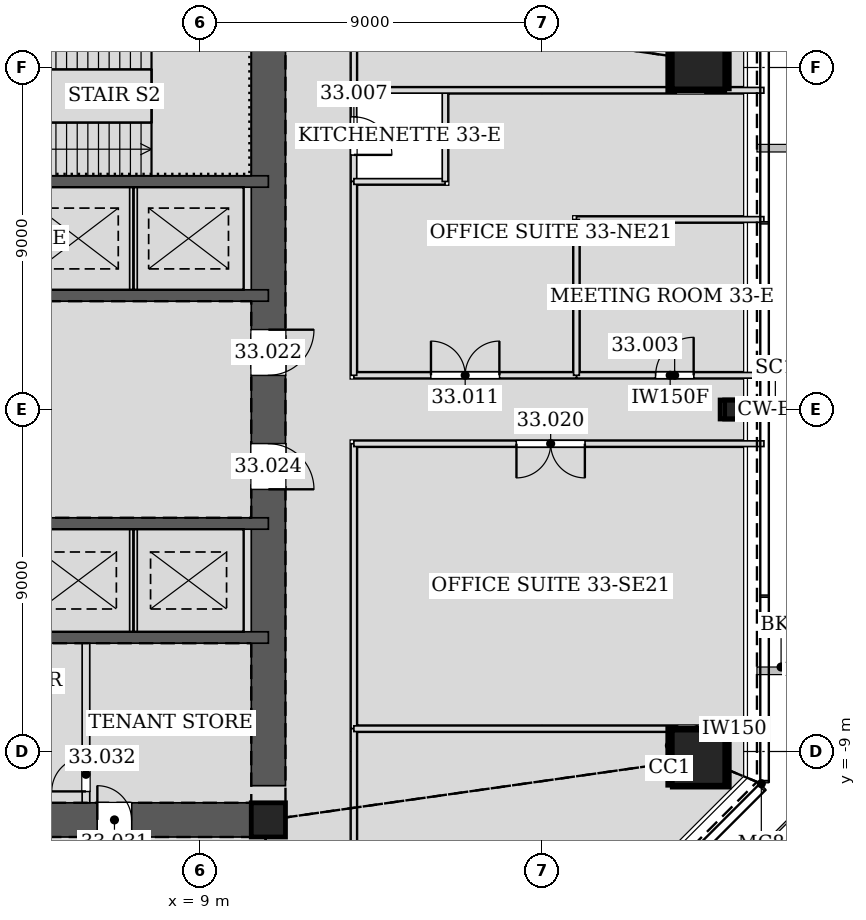
"""IFC4 building model, lengths in metres.
Left out: names, types, materials, properties, quantities, classifications, styles, units other than length and angle.
Written with IfcOpenShell. Run it as: python <this file> out.ifc"""

import sys

from ifc_helpers import new_model, si_unit, direction, frame, frame_2d, origin, origin_2d, place, context, subcontext, project, spatial, rectangle, hollow_rectangle, extrude, element, fill, save


model = new_model("IFC4")
c1 = context("Model", 3, precision=1e-05, world=origin(), true_north=direction((0.0, 1.0)))
c2 = subcontext(c1, "Body", "Model", "MODEL_VIEW")
j1 = project(units=[si_unit("LENGTHUNIT", "METRE"), si_unit("PLANEANGLEUNIT", "RADIAN")], contexts=[c1])
p1 = place(None, origin())
s1 = spatial("IfcSite", under=j1, at=p1, CompositionType="ELEMENT")
p2 = place(p1, origin())
s2 = spatial("IfcBuilding", under=s1, at=p2, CompositionType="ELEMENT")
p3 = place(p2, frame((0.0, 0.0, 147.0)))
s3 = spatial("IfcBuildingStorey", under=s2, at=p3, CompositionType="ELEMENT", Elevation=147.0)
for number, where, z_axis, x_axis in (
    (1, (22.178, 9.187, 0.0), (-0.028, -0.012, 1.0), (0.384, -0.923, 0.0)),
    (2, (22.178, -9.187, 0.0), (-0.028, 0.012, 1.0), (-0.384, -0.923, 0.0)),
):
    element("IfcColumn", number, at=place(p3, frame(where, z_axis=z_axis, x_axis=x_axis)), inside=s3, PredefinedType="COLUMN", context=c2, shape_type="SweptSolid", body=[
        extrude(hollow_rectangle(XDim=1.5, YDim=1.5, WallThickness=0.07, at=origin_2d()), origin(), (0.0, 0.0, 1.0), 4.202),
    ])
p4 = place(p3, frame((23.056, 0.0, 0.0), z_axis=(-0.028297679255, 0.0, 0.99959954049), x_axis=(0.0, -1.0, 0.0)))
e3 = element("IfcColumn", 3, at=p4, inside=s3, PredefinedType="COLUMN", context=c2, shape_type="SweptSolid", body=[
    extrude(hollow_rectangle(XDim=0.5, YDim=0.5, WallThickness=0.025, at=origin_2d()), origin(), (0.0, 0.0, 1.0), 4.202),
])
p5 = place(p3, frame((10.8, -10.8, 0.0), z_axis=(0.0, 0.0, 1.0), x_axis=(1.0, 0.0, 0.0)))
e4 = element("IfcColumn", 4, at=p5, inside=s3, PredefinedType="COLUMN", context=c2, shape_type="SweptSolid", body=[
    extrude(hollow_rectangle(XDim=0.9, YDim=0.9, WallThickness=0.06, at=origin_2d()), origin(), (0.0, 0.0, 1.0), 4.2),
])
p6 = place(p3, frame((-10.8, -10.8, 0.0), z_axis=(0.0, 0.0, 1.0), x_axis=(1.0, 0.0, 0.0)))
e5 = element("IfcWall", 5, at=p6, inside=s3, PredefinedType="SOLIDWALL", context=c2, shape_type="SweptSolid", body=[
    extrude(rectangle(XDim=21.6, YDim=0.9, at=frame_2d((10.8, 0.0))), origin(), (0.0, 0.0, 1.0), 4.2),
])
p7 = place(p6, frame((10.05, 0.0, 0.0)))
e6 = element("IfcOpeningElement", 6, at=p7, cuts=e5, PredefinedType="OPENING", context=c2, shape_type="SweptSolid", body=[
    extrude(rectangle(XDim=1.5, YDim=2.1, at=frame_2d((0.75, 1.05))), frame((0.0, 0.46, 0.0), z_axis=(0.0, -1.0, 0.0), x_axis=(1.0, 0.0, 0.0)), (0.0, 0.0, 1.0), 0.92),
])
p8 = place(p6, frame((17.1, 0.0, 0.0)))
e7 = element("IfcOpeningElement", 7, at=p8, cuts=e5, PredefinedType="OPENING", context=c2, shape_type="SweptSolid", body=[
    extrude(rectangle(XDim=0.9, YDim=2.1, at=frame_2d((0.45, 1.05))), frame((0.0, 0.46, 0.0), z_axis=(0.0, -1.0, 0.0), x_axis=(1.0, 0.0, 0.0)), (0.0, 0.0, 1.0), 0.92),
])
p9 = place(p3, frame((10.8, -10.8, 0.0), z_axis=(0.0, 0.0, 1.0), x_axis=(0.0, 1.0, 0.0)))
e8 = element("IfcWall", 8, at=p9, inside=s3, PredefinedType="SOLIDWALL", context=c2, shape_type="SweptSolid", body=[
    extrude(rectangle(XDim=21.6, YDim=0.9, at=frame_2d((10.8, 0.0))), origin(), (0.0, 0.0, 1.0), 4.2),
])
p10 = place(p9, frame((11.7, 0.0, 0.0)))
e9 = element("IfcOpeningElement", 9, at=p10, cuts=e8, PredefinedType="OPENING", context=c2, shape_type="SweptSolid", body=[
    extrude(rectangle(XDim=1.2, YDim=2.1, at=frame_2d((0.6, 1.05))), frame((0.0, 0.46, 0.0), z_axis=(0.0, -1.0, 0.0), x_axis=(1.0, 0.0, 0.0)), (0.0, 0.0, 1.0), 0.92),
])
p11 = place(p9, frame((8.7, 0.0, 0.0)))
e10 = element("IfcOpeningElement", 10, at=p11, cuts=e8, PredefinedType="OPENING", context=c2, shape_type="SweptSolid", body=[
    extrude(rectangle(XDim=1.2, YDim=2.1, at=frame_2d((0.6, 1.05))), frame((0.0, 0.46, 0.0), z_axis=(0.0, -1.0, 0.0), x_axis=(1.0, 0.0, 0.0)), (0.0, 0.0, 1.0), 0.92),
])
p12 = place(p3, frame((-10.8, 3.0, 0.0), z_axis=(0.0, 0.0, 1.0), x_axis=(1.0, 0.0, 0.0)))
e11 = element("IfcWall", 11, at=p12, inside=s3, PredefinedType="SOLIDWALL", context=c2, shape_type="SweptSolid", body=[
    extrude(rectangle(XDim=21.6, YDim=0.3, at=frame_2d((10.8, 0.0))), origin(), (0.0, 0.0, 1.0), 4.2),
])
p13 = place(p12, frame((1.65, 0.0, 0.0)))
e12 = element("IfcOpeningElement", 12, at=p13, cuts=e11, PredefinedType="OPENING", context=c2, shape_type="SweptSolid", body=[
    extrude(rectangle(XDim=0.9, YDim=2.1, at=frame_2d((0.45, 1.05))), frame((0.0, 0.16, 0.0), z_axis=(0.0, -1.0, 0.0), x_axis=(1.0, 0.0, 0.0)), (0.0, 0.0, 1.0), 0.32),
])
p14 = place(p12, frame((4.55, 0.0, 0.0)))
e13 = element("IfcOpeningElement", 13, at=p14, cuts=e11, PredefinedType="OPENING", context=c2, shape_type="SweptSolid", body=[
    extrude(rectangle(XDim=0.9, YDim=2.1, at=frame_2d((0.45, 1.05))), frame((0.0, 0.16, 0.0), z_axis=(0.0, -1.0, 0.0), x_axis=(1.0, 0.0, 0.0)), (0.0, 0.0, 1.0), 0.32),
])
p15 = place(p12, frame((7.4, 0.0, 0.0)))
e14 = element("IfcOpeningElement", 14, at=p15, cuts=e11, PredefinedType="OPENING", context=c2, shape_type="SweptSolid", body=[
    extrude(rectangle(XDim=1.0, YDim=2.1, at=frame_2d((0.5, 1.05))), frame((0.0, 0.16, 0.0), z_axis=(0.0, -1.0, 0.0), x_axis=(1.0, 0.0, 0.0)), (0.0, 0.0, 1.0), 0.32),
])
p16 = place(p12, frame((13.25, 0.0, 0.0)))
e15 = element("IfcOpeningElement", 15, at=p16, cuts=e11, PredefinedType="OPENING", context=c2, shape_type="SweptSolid", body=[
    extrude(rectangle(XDim=0.9, YDim=2.1, at=frame_2d((0.45, 1.05))), frame((0.0, 0.16, 0.0), z_axis=(0.0, -1.0, 0.0), x_axis=(1.0, 0.0, 0.0)), (0.0, 0.0, 1.0), 0.32),
])
p17 = place(p3, frame((-10.8, 6.0, 0.0), z_axis=(0.0, 0.0, 1.0), x_axis=(1.0, 0.0, 0.0)))
e16 = element("IfcWall", 16, at=p17, inside=s3, PredefinedType="SOLIDWALL", context=c2, shape_type="SweptSolid", body=[
    extrude(rectangle(XDim=21.6, YDim=0.3, at=frame_2d((10.8, 0.0))), origin(), (0.0, 0.0, 1.0), 4.2),
])
p18 = place(p17, frame((10.25, 0.0, 0.0)))
e17 = element("IfcOpeningElement", 17, at=p18, cuts=e16, PredefinedType="OPENING", context=c2, shape_type="SweptSolid", body=[
    extrude(rectangle(XDim=1.1, YDim=2.1, at=frame_2d((0.55, 1.05))), frame((0.0, 0.16, 0.0), z_axis=(0.0, -1.0, 0.0), x_axis=(1.0, 0.0, 0.0)), (0.0, 0.0, 1.0), 0.32),
])
p19 = place(p3, frame((-10.8, -3.0, 0.0), z_axis=(0.0, 0.0, 1.0), x_axis=(1.0, 0.0, 0.0)))
e18 = element("IfcWall", 18, at=p19, inside=s3, PredefinedType="SOLIDWALL", context=c2, shape_type="SweptSolid", body=[
    extrude(rectangle(XDim=21.6, YDim=0.3, at=frame_2d((10.8, 0.0))), origin(), (0.0, 0.0, 1.0), 4.2),
])
p20 = place(p19, frame((1.55, 0.0, 0.0)))
e19 = element("IfcOpeningElement", 19, at=p20, cuts=e18, PredefinedType="OPENING", context=c2, shape_type="SweptSolid", body=[
    extrude(rectangle(XDim=1.1, YDim=2.1, at=frame_2d((0.55, 1.05))), frame((0.0, 0.16, 0.0), z_axis=(0.0, -1.0, 0.0), x_axis=(1.0, 0.0, 0.0)), (0.0, 0.0, 1.0), 0.32),
])
p21 = place(p19, frame((4.45, 0.0, 0.0)))
e20 = element("IfcOpeningElement", 20, at=p21, cuts=e18, PredefinedType="OPENING", context=c2, shape_type="SweptSolid", body=[
    extrude(rectangle(XDim=1.1, YDim=2.1, at=frame_2d((0.55, 1.05))), frame((0.0, 0.16, 0.0), z_axis=(0.0, -1.0, 0.0), x_axis=(1.0, 0.0, 0.0)), (0.0, 0.0, 1.0), 0.32),
])
p22 = place(p19, frame((7.35, 0.0, 0.0)))
e21 = element("IfcOpeningElement", 21, at=p22, cuts=e18, PredefinedType="OPENING", context=c2, shape_type="SweptSolid", body=[
    extrude(rectangle(XDim=1.1, YDim=2.1, at=frame_2d((0.55, 1.05))), frame((0.0, 0.16, 0.0), z_axis=(0.0, -1.0, 0.0), x_axis=(1.0, 0.0, 0.0)), (0.0, 0.0, 1.0), 0.32),
])
p23 = place(p19, frame((13.15, 0.0, 0.0)))
e22 = element("IfcOpeningElement", 22, at=p23, cuts=e18, PredefinedType="OPENING", context=c2, shape_type="SweptSolid", body=[
    extrude(rectangle(XDim=1.1, YDim=2.1, at=frame_2d((0.55, 1.05))), frame((0.0, 0.16, 0.0), z_axis=(0.0, -1.0, 0.0), x_axis=(1.0, 0.0, 0.0)), (0.0, 0.0, 1.0), 0.32),
])
p24 = place(p3, frame((-10.8, -6.0, 0.0), z_axis=(0.0, 0.0, 1.0), x_axis=(1.0, 0.0, 0.0)))
e23 = element("IfcWall", 23, at=p24, inside=s3, PredefinedType="SOLIDWALL", context=c2, shape_type="SweptSolid", body=[
    extrude(rectangle(XDim=21.6, YDim=0.3, at=frame_2d((10.8, 0.0))), origin(), (0.0, 0.0, 1.0), 4.2),
])
p25 = place(p24, frame((10.25, 0.0, 0.0)))
e24 = element("IfcOpeningElement", 24, at=p25, cuts=e23, PredefinedType="OPENING", context=c2, shape_type="SweptSolid", body=[
    extrude(rectangle(XDim=1.1, YDim=2.1, at=frame_2d((0.55, 1.05))), frame((0.0, 0.16, 0.0), z_axis=(0.0, -1.0, 0.0), x_axis=(1.0, 0.0, 0.0)), (0.0, 0.0, 1.0), 0.32),
])
p26 = place(p3, frame((23.84, 0.9, 0.0), z_axis=(0.0, 0.0, 1.0), x_axis=(-1.0, 0.0, 0.0)))
e25 = element("IfcWall", 25, at=p26, inside=s3, PredefinedType="PARTITIONING", context=c2, shape_type="SweptSolid", body=[
    extrude(rectangle(XDim=4.935, YDim=0.15, at=frame_2d((2.468, 0.0))), origin(), (0.0, 0.0, 1.0), 3.426),
])
p27 = place(p26, frame((1.85, 0.0, 0.0)))
e26 = element("IfcOpeningElement", 26, at=p27, cuts=e25, PredefinedType="OPENING", context=c2, shape_type="SweptSolid", body=[
    extrude(rectangle(XDim=1.0, YDim=2.1, at=frame_2d((0.5, 1.05))), frame((0.0, 0.085, 0.0), z_axis=(0.0, -1.0, 0.0), x_axis=(1.0, 0.0, 0.0)), (0.0, 0.0, 1.0), 0.17),
])
p28 = place(p3, frame((13.05, 5.999, 0.0), z_axis=(0.0, 0.0, 1.0), x_axis=(0.0, 1.0, 0.0)))
e27 = element("IfcWall", 27, at=p28, inside=s3, PredefinedType="PARTITIONING", context=c2, shape_type="SweptSolid", body=[
    extrude(rectangle(XDim=2.402, YDim=0.15, at=frame_2d((1.201, 0.0))), origin(), (0.0, 0.0, 1.0), 4.035),
])
p29 = place(p28, frame((0.701, 0.0, 0.0)))
e28 = element("IfcOpeningElement", 28, at=p29, cuts=e27, PredefinedType="OPENING", context=c2, shape_type="SweptSolid", body=[
    extrude(rectangle(XDim=1.0, YDim=2.1, at=frame_2d((0.5, 1.05))), frame((0.0, 0.085, 0.0), z_axis=(0.0, -1.0, 0.0), x_axis=(1.0, 0.0, 0.0)), (0.0, 0.0, 1.0), 0.17),
])
p30 = place(p3, frame((18.907, 0.9, 0.0), z_axis=(0.0, 0.0, 1.0), x_axis=(-1.0, 0.0, 0.0)))
e29 = element("IfcWall", 29, at=p30, inside=s3, PredefinedType="PARTITIONING", context=c2, shape_type="SweptSolid", body=[
    extrude(rectangle(XDim=5.857, YDim=0.15, at=frame_2d((2.929, 0.0))), origin(), (0.0, 0.0, 1.0), 3.426),
])
p31 = place(p30, frame((2.029, 0.0, 0.0)))
e30 = element("IfcOpeningElement", 30, at=p31, cuts=e29, PredefinedType="OPENING", context=c2, shape_type="SweptSolid", body=[
    extrude(rectangle(XDim=1.8, YDim=2.4, at=frame_2d((0.9, 1.2))), frame((0.0, 0.085, 0.0), z_axis=(0.0, -1.0, 0.0), x_axis=(1.0, 0.0, 0.0)), (0.0, 0.0, 1.0), 0.17),
])
p32 = place(p3, frame((13.05, 0.9, 0.0), z_axis=(0.0, 0.0, 1.0), x_axis=(0.0, 1.0, 0.0)))
e31 = element("IfcWall", 31, at=p32, inside=s3, PredefinedType="PARTITIONING", context=c2, shape_type="SweptSolid", body=[
    extrude(rectangle(XDim=5.101, YDim=0.15, at=frame_2d((2.551, 0.0))), origin(), (0.0, 0.0, 1.0), 4.035),
])
p33 = place(p3, frame((13.05, 8.399, 0.0), z_axis=(0.0, 0.0, 1.0), x_axis=(0.0, 1.0, 0.0)))
e32 = element("IfcWall", 32, at=p33, inside=s3, PredefinedType="PARTITIONING", context=c2, shape_type="SweptSolid", body=[
    extrude(rectangle(XDim=4.651, YDim=0.15, at=frame_2d((2.326, 0.0))), origin(), (0.0, 0.0, 1.0), 3.098),
])
p34 = place(p33, frame((1.426, 0.0, 0.0)))
e33 = element("IfcOpeningElement", 33, at=p34, cuts=e32, PredefinedType="OPENING", context=c2, shape_type="SweptSolid", body=[
    extrude(rectangle(XDim=1.8, YDim=2.4, at=frame_2d((0.9, 1.2))), frame((0.0, 0.085, 0.0), z_axis=(0.0, -1.0, 0.0), x_axis=(1.0, 0.0, 0.0)), (0.0, 0.0, 1.0), 0.17),
])
p35 = place(p3, frame((13.05, -8.401, 0.0), z_axis=(0.0, 0.0, 1.0), x_axis=(0.0, 1.0, 0.0)))
e34 = element("IfcWall", 34, at=p35, inside=s3, PredefinedType="PARTITIONING", context=c2, shape_type="SweptSolid", body=[
    extrude(rectangle(XDim=7.501, YDim=0.15, at=frame_2d((3.75, 0.0))), origin(), (0.0, 0.0, 1.0), 4.035),
])
p36 = place(p3, frame((13.05, -0.9, 0.0), z_axis=(0.0, 0.0, 1.0), x_axis=(1.0, 0.0, 0.0)))
e35 = element("IfcWall", 35, at=p36, inside=s3, PredefinedType="PARTITIONING", context=c2, shape_type="SweptSolid", body=[
    extrude(rectangle(XDim=10.79, YDim=0.15, at=frame_2d((5.395, 0.0))), origin(), (0.0, 0.0, 1.0), 3.426),
])
p37 = place(p36, frame((4.278, 0.0, 0.0)))
e36 = element("IfcOpeningElement", 36, at=p37, cuts=e35, PredefinedType="OPENING", context=c2, shape_type="SweptSolid", body=[
    extrude(rectangle(XDim=1.8, YDim=2.4, at=frame_2d((0.9, 1.2))), frame((0.0, 0.085, 0.0), z_axis=(0.0, -1.0, 0.0), x_axis=(1.0, 0.0, 0.0)), (0.0, 0.0, 1.0), 0.17),
])
p38 = place(p3, frame((13.05, -13.05, 0.0), z_axis=(0.0, 0.0, 1.0), x_axis=(0.0, 1.0, 0.0)))
e37 = element("IfcWall", 37, at=p38, inside=s3, PredefinedType="PARTITIONING", context=c2, shape_type="SweptSolid", body=[
    extrude(rectangle(XDim=4.651, YDim=0.15, at=frame_2d((2.326, 0.0))), origin(), (0.0, 0.0, 1.0), 3.098),
])
p39 = place(p3, frame((23.838, 5.0, 0.0), z_axis=(0.0, 0.0, 1.0), x_axis=(-1.0, 0.0, 0.0)))
e38 = element("IfcWall", 38, at=p39, inside=s3, PredefinedType="PARTITIONING", context=c2, shape_type="SweptSolid", body=[
    extrude(rectangle(XDim=4.932, YDim=0.15, at=frame_2d((2.466, 0.0))), origin(), (0.0, 0.0, 1.0), 3.426),
])
p40 = place(p3, frame((18.906, 5.0, 0.0), z_axis=(0.0, 0.0, 1.0), x_axis=(0.0, -1.0, 0.0)))
e39 = element("IfcWall", 39, at=p40, inside=s3, PredefinedType="PARTITIONING", context=c2, shape_type="SweptSolid", body=[
    extrude(rectangle(XDim=4.1, YDim=0.15, at=frame_2d((2.05, 0.0))), origin(), (0.0, 0.0, 1.0), 4.035),
])
p41 = place(p3, frame((13.05, 6.0, 0.0), z_axis=(0.0, 0.0, 1.0), x_axis=(1.0, 0.0, 0.0)))
e40 = element("IfcWall", 40, at=p41, inside=s3, PredefinedType="PARTITIONING", context=c2, shape_type="SweptSolid", body=[
    extrude(rectangle(XDim=2.4, YDim=0.15, at=frame_2d((1.2, 0.0))), origin(), (0.0, 0.0, 1.0), 3.426),
])
p42 = place(p3, frame((15.45, 6.0, 0.0), z_axis=(0.0, 0.0, 1.0), x_axis=(0.0, 1.0, 0.0)))
e41 = element("IfcWall", 41, at=p42, inside=s3, PredefinedType="PARTITIONING", context=c2, shape_type="SweptSolid", body=[
    extrude(rectangle(XDim=2.4, YDim=0.15, at=frame_2d((1.2, 0.0))), origin(), (0.0, 0.0, 1.0), 4.035),
])
p43 = place(p3, frame((13.05, 8.4, 0.0), z_axis=(0.0, 0.0, 1.0), x_axis=(1.0, 0.0, 0.0)))
e42 = element("IfcWall", 42, at=p43, inside=s3, PredefinedType="PARTITIONING", context=c2, shape_type="SweptSolid", body=[
    extrude(rectangle(XDim=8.482, YDim=0.15, at=frame_2d((4.241, 0.0))), origin(), (0.0, 0.0, 1.0), 3.426),
])
p44 = place(p3, frame((23.838, 8.4, 0.0), z_axis=(0.0, 0.0, 1.0), x_axis=(-1.0, 0.0, 0.0)))
e43 = element("IfcWall", 43, at=p44, inside=s3, PredefinedType="PARTITIONING", context=c2, shape_type="SweptSolid", body=[
    extrude(rectangle(XDim=1.55, YDim=0.15, at=frame_2d((0.775, 0.0))), origin(), (0.0, 0.0, 1.0), 4.035),
])
p45 = place(p3, frame((13.05, -8.4, 0.0), z_axis=(0.0, 0.0, 1.0), x_axis=(1.0, 0.0, 0.0)))
e44 = element("IfcWall", 44, at=p45, inside=s3, PredefinedType="PARTITIONING", context=c2, shape_type="SweptSolid", body=[
    extrude(rectangle(XDim=8.482, YDim=0.15, at=frame_2d((4.241, 0.0))), origin(), (0.0, 0.0, 1.0), 3.426),
])
p46 = place(p3, frame((22.289, -8.4, 0.0), z_axis=(0.0, 0.0, 1.0), x_axis=(1.0, 0.0, 0.0)))
e45 = element("IfcWall", 45, at=p46, inside=s3, PredefinedType="PARTITIONING", context=c2, shape_type="SweptSolid", body=[
    extrude(rectangle(XDim=1.55, YDim=0.15, at=frame_2d((0.775, 0.0))), origin(), (0.0, 0.0, 1.0), 4.035),
])
for number, where, z_axis, x_axis in (
    (46, (7.25, 3.15, 0.0), (0.0, 0.0, 1.0), (0.0, 1.0, 0.0)),
    (47, (7.25, -5.85, 0.0), (0.0, 0.0, 1.0), (0.0, 1.0, 0.0)),
):
    element("IfcWall", number, at=place(p3, frame(where, z_axis=z_axis, x_axis=x_axis)), inside=s3, PredefinedType="PARTITIONING", context=c2, shape_type="SweptSolid", body=[
        extrude(rectangle(XDim=2.7, YDim=0.2, at=frame_2d((1.35, 0.0))), origin(), (0.0, 0.0, 1.0), 4.2),
    ])
p47 = place(p3, frame((6.0, -10.35, 0.0), z_axis=(0.0, 0.0, 1.0), x_axis=(0.0, 1.0, 0.0)))
e48 = element("IfcWall", 48, at=p47, inside=s3, PredefinedType="PARTITIONING", context=c2, shape_type="SweptSolid", body=[
    extrude(rectangle(XDim=4.2, YDim=0.2, at=frame_2d((2.1, 0.0))), origin(), (0.0, 0.0, 1.0), 4.035),
])
p48 = place(p47, frame((0.3, 0.0, 0.0)))
e49 = element("IfcOpeningElement", 49, at=p48, cuts=e48, PredefinedType="OPENING", context=c2, shape_type="SweptSolid", body=[
    extrude(rectangle(XDim=0.9, YDim=2.1, at=frame_2d((0.45, 1.05))), frame((0.0, 0.11, 0.0), z_axis=(0.0, -1.0, 0.0), x_axis=(1.0, 0.0, 0.0)), (0.0, 0.0, 1.0), 0.22),
])
p49 = place(p27, frame((1.0, 0.0, 0.0), z_axis=(0.0, 0.0, 1.0), x_axis=(-1.0, 0.0, 0.0)))
e50 = element("IfcDoor", 50, at=p49, inside=s3, OperationType="SINGLE_SWING_RIGHT", PredefinedType="DOOR", context=c2, shape_type="SweptSolid", body=[
    extrude(rectangle(XDim=1.0, YDim=2.1, at=frame_2d((0.5, 1.05))), frame((0.0, 0.025, 0.0), z_axis=(0.0, -1.0, 0.0), x_axis=(1.0, 0.0, 0.0)), (0.0, 0.0, 1.0), 0.05),
])
fill(e26, e50)
p50 = place(p29, frame((1.0, 0.0, 0.0), z_axis=(0.0, 0.0, 1.0), x_axis=(-1.0, 0.0, 0.0)))
e51 = element("IfcDoor", 51, at=p50, inside=s3, OperationType="SINGLE_SWING_RIGHT", PredefinedType="DOOR", context=c2, shape_type="SweptSolid", body=[
    extrude(rectangle(XDim=1.0, YDim=2.1, at=frame_2d((0.5, 1.05))), frame((0.0, 0.025, 0.0), z_axis=(0.0, -1.0, 0.0), x_axis=(1.0, 0.0, 0.0)), (0.0, 0.0, 1.0), 0.05),
])
fill(e28, e51)
p51 = place(p31, frame((1.8, 0.0, 0.0), z_axis=(0.0, 0.0, 1.0), x_axis=(-1.0, 0.0, 0.0)))
e52 = element("IfcDoor", 52, at=p51, inside=s3, OperationType="DOUBLE_DOOR_SINGLE_SWING", PredefinedType="DOOR", context=c2, shape_type="SweptSolid", body=[
    extrude(rectangle(XDim=1.8, YDim=2.4, at=frame_2d((0.9, 1.2))), frame((0.0, 0.025, 0.0), z_axis=(0.0, -1.0, 0.0), x_axis=(1.0, 0.0, 0.0)), (0.0, 0.0, 1.0), 0.05),
])
fill(e30, e52)
p52 = place(p37, frame((1.8, 0.0, 0.0), z_axis=(0.0, 0.0, 1.0), x_axis=(-1.0, 0.0, 0.0)))
e53 = element("IfcDoor", 53, at=p52, inside=s3, OperationType="DOUBLE_DOOR_SINGLE_SWING", PredefinedType="DOOR", context=c2, shape_type="SweptSolid", body=[
    extrude(rectangle(XDim=1.8, YDim=2.4, at=frame_2d((0.9, 1.2))), frame((0.0, 0.025, 0.0), z_axis=(0.0, -1.0, 0.0), x_axis=(1.0, 0.0, 0.0)), (0.0, 0.0, 1.0), 0.05),
])
fill(e36, e53)
p53 = place(p10, frame((1.2, 0.0, 0.0), z_axis=(0.0, 0.0, 1.0), x_axis=(-1.0, 0.0, 0.0)))
e54 = element("IfcDoor", 54, at=p53, inside=s3, OperationType="SINGLE_SWING_LEFT", PredefinedType="DOOR", context=c2, shape_type="SweptSolid", body=[
    extrude(rectangle(XDim=1.2, YDim=2.1, at=frame_2d((0.6, 1.05))), frame((0.0, 0.025, 0.0), z_axis=(0.0, -1.0, 0.0), x_axis=(1.0, 0.0, 0.0)), (0.0, 0.0, 1.0), 0.05),
])
fill(e9, e54)
p54 = place(p11, frame((1.2, 0.0, 0.0), z_axis=(0.0, 0.0, 1.0), x_axis=(-1.0, 0.0, 0.0)))
e55 = element("IfcDoor", 55, at=p54, inside=s3, OperationType="SINGLE_SWING_RIGHT", PredefinedType="DOOR", context=c2, shape_type="SweptSolid", body=[
    extrude(rectangle(XDim=1.2, YDim=2.1, at=frame_2d((0.6, 1.05))), frame((0.0, 0.025, 0.0), z_axis=(0.0, -1.0, 0.0), x_axis=(1.0, 0.0, 0.0)), (0.0, 0.0, 1.0), 0.05),
])
fill(e10, e55)
p55 = place(p8, origin())
e56 = element("IfcDoor", 56, at=p55, inside=s3, OperationType="SINGLE_SWING_LEFT", PredefinedType="DOOR", context=c2, shape_type="SweptSolid", body=[
    extrude(rectangle(XDim=0.9, YDim=2.1, at=frame_2d((0.45, 1.05))), frame((0.0, 0.025, 0.0), z_axis=(0.0, -1.0, 0.0), x_axis=(1.0, 0.0, 0.0)), (0.0, 0.0, 1.0), 0.05),
])
fill(e7, e56)
p56 = place(p48, origin())
e57 = element("IfcDoor", 57, at=p56, inside=s3, OperationType="SINGLE_SWING_LEFT", PredefinedType="DOOR", context=c2, shape_type="SweptSolid", body=[
    extrude(rectangle(XDim=0.9, YDim=2.1, at=frame_2d((0.45, 1.05))), frame((0.0, 0.025, 0.0), z_axis=(0.0, -1.0, 0.0), x_axis=(1.0, 0.0, 0.0)), (0.0, 0.0, 1.0), 0.05),
])
fill(e49, e57)
save(model, sys.argv[1])
